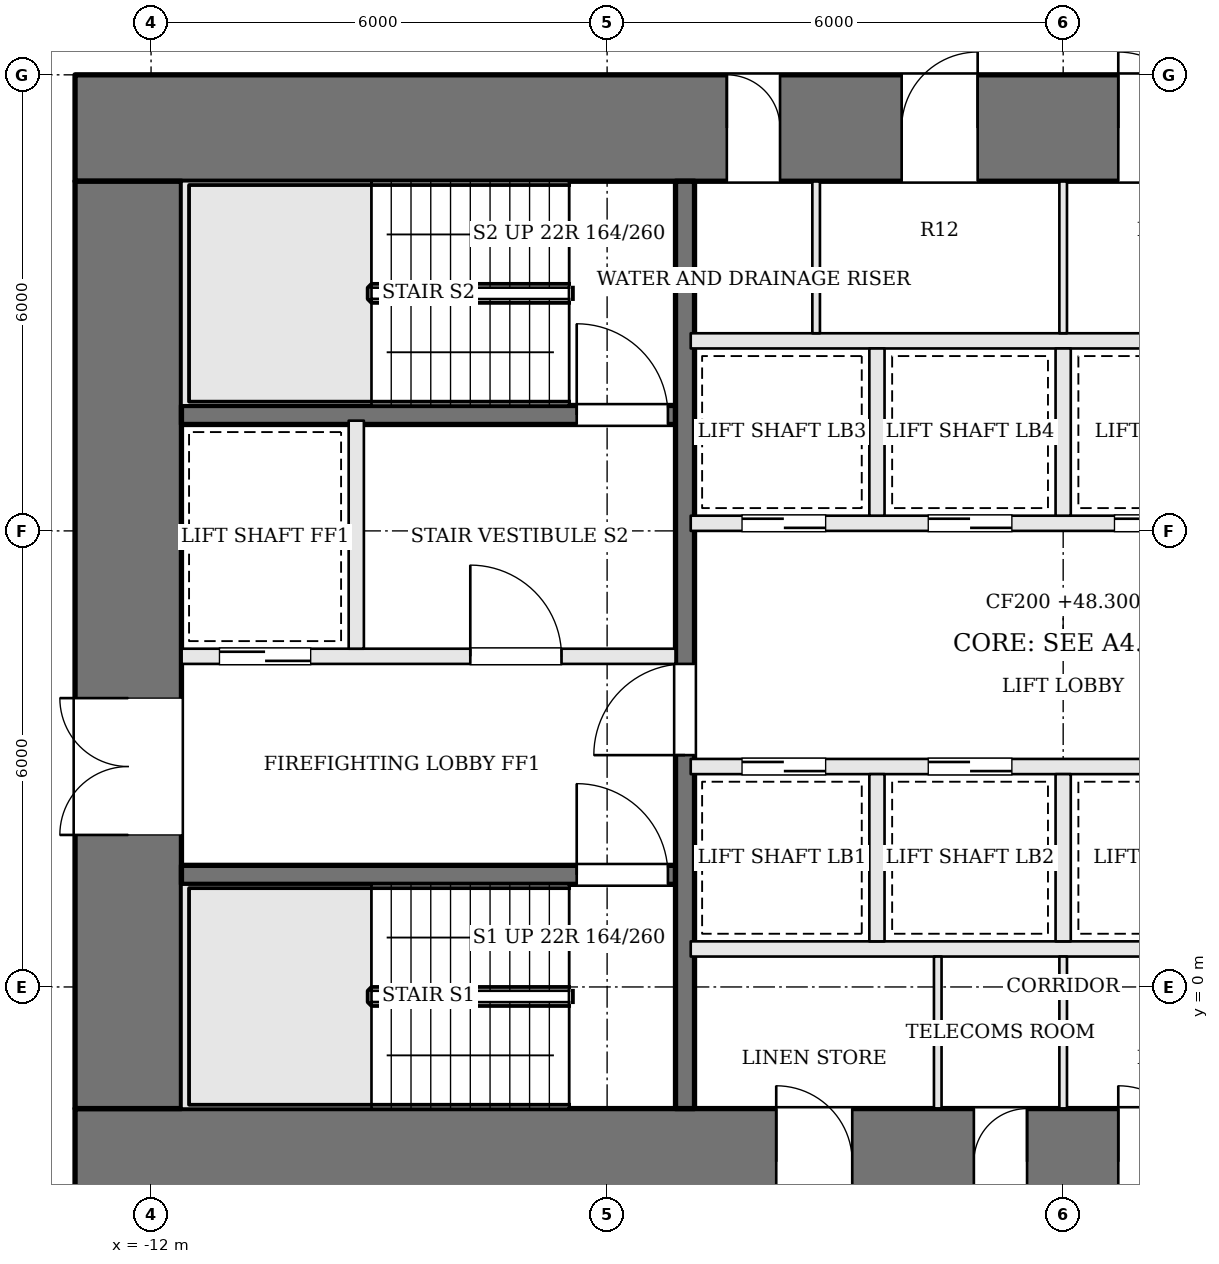
"""IFC4 building model, lengths in metres.
Left out: names, types, materials, properties, quantities, classifications, styles, units other than length and angle.
Written with IfcOpenShell. Run it as: python <this file> out.ifc"""

import sys

from ifc_helpers import new_model, si_unit, direction, frame, frame_2d, origin, place, context, subcontext, project, spatial, rectangle, extrude, element, fill, save


model = new_model("IFC4")
c1 = context("Model", 3, precision=1e-05, world=origin(), true_north=direction((0.0, 1.0)))
c2 = subcontext(c1, "Body", "Model", "MODEL_VIEW")
j1 = project(units=[si_unit("LENGTHUNIT", "METRE"), si_unit("PLANEANGLEUNIT", "RADIAN")], contexts=[c1])
p1 = place(None, origin())
s1 = spatial("IfcSite", under=j1, at=p1, CompositionType="ELEMENT")
p2 = place(p1, origin())
s2 = spatial("IfcBuilding", under=s1, at=p2, CompositionType="ELEMENT")
p3 = place(p2, frame((0.0, 0.0, 48.3)))
s3 = spatial("IfcBuildingStorey", under=s2, at=p3, CompositionType="ELEMENT", Elevation=48.3)
p4 = place(p3, frame((-13.0, 11.3, 0.0), z_axis=(0.0, 0.0, 1.0), x_axis=(1.0, 0.0, 0.0)))
e1 = element("IfcWall", 1, at=p4, inside=s3, PredefinedType="SHEAR", context=c2, shape_type="SweptSolid", body=[
    extrude(rectangle(XDim=26.0, YDim=1.4, at=frame_2d((13.0, 0.0))), origin(), (0.0, 0.0, 1.0), 3.6),
])
p5 = place(p4, frame((8.575, 0.0, 0.0)))
e2 = element("IfcOpeningElement", 2, at=p5, cuts=e1, PredefinedType="OPENING", context=c2, shape_type="SweptSolid", body=[
    extrude(rectangle(XDim=0.7, YDim=2.1, at=frame_2d((0.35, 1.05))), frame((0.0, 0.71, 0.0), z_axis=(0.0, -1.0, 0.0), x_axis=(1.0, 0.0, 0.0)), (0.0, 0.0, 1.0), 1.42),
])
p6 = place(p4, frame((10.875, 0.0, 0.0)))
e3 = element("IfcOpeningElement", 3, at=p6, cuts=e1, PredefinedType="OPENING", context=c2, shape_type="SweptSolid", body=[
    extrude(rectangle(XDim=1.0, YDim=2.1, at=frame_2d((0.5, 1.05))), frame((0.0, 0.71, 0.0), z_axis=(0.0, -1.0, 0.0), x_axis=(1.0, 0.0, 0.0)), (0.0, 0.0, 1.0), 1.42),
])
p7 = place(p4, frame((13.725, 0.0, 0.0)))
e4 = element("IfcOpeningElement", 4, at=p7, cuts=e1, PredefinedType="OPENING", context=c2, shape_type="SweptSolid", body=[
    extrude(rectangle(XDim=1.0, YDim=2.1, at=frame_2d((0.5, 1.05))), frame((0.0, 0.71, 0.0), z_axis=(0.0, -1.0, 0.0), x_axis=(1.0, 0.0, 0.0)), (0.0, 0.0, 1.0), 1.42),
])
p8 = place(p4, frame((16.175, 0.0, 0.0)))
e5 = element("IfcOpeningElement", 5, at=p8, cuts=e1, PredefinedType="OPENING", context=c2, shape_type="SweptSolid", body=[
    extrude(rectangle(XDim=1.0, YDim=2.1, at=frame_2d((0.5, 1.05))), frame((0.0, 0.71, 0.0), z_axis=(0.0, -1.0, 0.0), x_axis=(1.0, 0.0, 0.0)), (0.0, 0.0, 1.0), 1.42),
])
p9 = place(p3, frame((-13.0, -2.3, 0.0), z_axis=(0.0, 0.0, 1.0), x_axis=(1.0, 0.0, 0.0)))
e6 = element("IfcWall", 6, at=p9, inside=s3, PredefinedType="SHEAR", context=c2, shape_type="SweptSolid", body=[
    extrude(rectangle(XDim=26.0, YDim=1.4, at=frame_2d((13.0, 0.0))), origin(), (0.0, 0.0, 1.0), 3.6),
])
p10 = place(p9, frame((9.225, 0.0, 0.0)))
e7 = element("IfcOpeningElement", 7, at=p10, cuts=e6, PredefinedType="OPENING", context=c2, shape_type="SweptSolid", body=[
    extrude(rectangle(XDim=1.0, YDim=2.1, at=frame_2d((0.5, 1.05))), frame((0.0, 0.71, 0.0), z_axis=(0.0, -1.0, 0.0), x_axis=(1.0, 0.0, 0.0)), (0.0, 0.0, 1.0), 1.42),
])
p11 = place(p9, frame((11.825, 0.0, 0.0)))
e8 = element("IfcOpeningElement", 8, at=p11, cuts=e6, PredefinedType="OPENING", context=c2, shape_type="SweptSolid", body=[
    extrude(rectangle(XDim=0.7, YDim=2.1, at=frame_2d((0.35, 1.05))), frame((0.0, 0.71, 0.0), z_axis=(0.0, -1.0, 0.0), x_axis=(1.0, 0.0, 0.0)), (0.0, 0.0, 1.0), 1.42),
])
p12 = place(p9, frame((13.725, 0.0, 0.0)))
e9 = element("IfcOpeningElement", 9, at=p12, cuts=e6, PredefinedType="OPENING", context=c2, shape_type="SweptSolid", body=[
    extrude(rectangle(XDim=1.0, YDim=2.1, at=frame_2d((0.5, 1.05))), frame((0.0, 0.71, 0.0), z_axis=(0.0, -1.0, 0.0), x_axis=(1.0, 0.0, 0.0)), (0.0, 0.0, 1.0), 1.42),
])
p13 = place(p9, frame((16.225, 0.0, 0.0)))
e10 = element("IfcOpeningElement", 10, at=p13, cuts=e6, PredefinedType="OPENING", context=c2, shape_type="SweptSolid", body=[
    extrude(rectangle(XDim=0.9, YDim=2.1, at=frame_2d((0.45, 1.05))), frame((0.0, 0.71, 0.0), z_axis=(0.0, -1.0, 0.0), x_axis=(1.0, 0.0, 0.0)), (0.0, 0.0, 1.0), 1.42),
])
p14 = place(p3, frame((-12.3, -1.6, 0.0), z_axis=(0.0, 0.0, 1.0), x_axis=(0.0, 1.0, 0.0)))
e11 = element("IfcWall", 11, at=p14, inside=s3, PredefinedType="SHEAR", context=c2, shape_type="SweptSolid", body=[
    extrude(rectangle(XDim=12.2, YDim=1.4, at=frame_2d((6.1, 0.0))), origin(), (0.0, 0.0, 1.0), 3.6),
])
p15 = place(p14, frame((3.6, 0.0, 0.0)))
e12 = element("IfcOpeningElement", 12, at=p15, cuts=e11, PredefinedType="OPENING", context=c2, shape_type="SweptSolid", body=[
    extrude(rectangle(XDim=1.8, YDim=2.1, at=frame_2d((0.9, 1.05))), frame((0.0, 0.71, 0.0), z_axis=(0.0, -1.0, 0.0), x_axis=(1.0, 0.0, 0.0)), (0.0, 0.0, 1.0), 1.42),
])
p16 = place(p3, frame((-11.6, 1.475, 0.0), z_axis=(0.0, 0.0, 1.0), x_axis=(1.0, 0.0, 0.0)))
e13 = element("IfcWall", 13, at=p16, inside=s3, PredefinedType="SOLIDWALL", context=c2, shape_type="SweptSolid", body=[
    extrude(rectangle(XDim=6.5, YDim=0.25, at=frame_2d((3.25, 0.0))), origin(), (0.0, 0.0, 1.0), 3.4),
])
p17 = place(p16, frame((5.2, 0.0, 0.0)))
e14 = element("IfcOpeningElement", 14, at=p17, cuts=e13, PredefinedType="OPENING", context=c2, shape_type="SweptSolid", body=[
    extrude(rectangle(XDim=1.2, YDim=2.1, at=frame_2d((0.6, 1.05))), frame((0.0, 0.135, 0.0), z_axis=(0.0, -1.0, 0.0), x_axis=(1.0, 0.0, 0.0)), (0.0, 0.0, 1.0), 0.27),
])
p18 = place(p3, frame((-11.6, 4.35, 0.0), z_axis=(0.0, 0.0, 1.0), x_axis=(1.0, 0.0, 0.0)))
e15 = element("IfcWall", 15, at=p18, inside=s3, PredefinedType="SOLIDWALL", context=c2, shape_type="SweptSolid", body=[
    extrude(rectangle(XDim=6.5, YDim=0.2, at=frame_2d((3.25, 0.0))), origin(), (0.0, 0.0, 1.0), 3.4),
])
p19 = place(p18, frame((3.8, 0.0, 0.0)))
e16 = element("IfcOpeningElement", 16, at=p19, cuts=e15, PredefinedType="OPENING", context=c2, shape_type="SweptSolid", body=[
    extrude(rectangle(XDim=1.2, YDim=2.1, at=frame_2d((0.6, 1.05))), frame((0.0, 0.11, 0.0), z_axis=(0.0, -1.0, 0.0), x_axis=(1.0, 0.0, 0.0)), (0.0, 0.0, 1.0), 0.22),
])
p20 = place(p18, frame((0.5, 0.0, 0.0)))
e17 = element("IfcOpeningElement", 17, at=p20, cuts=e15, PredefinedType="OPENING", context=c2, shape_type="SweptSolid", body=[
    extrude(rectangle(XDim=1.2, YDim=2.1, at=frame_2d((0.6, 1.05))), frame((0.0, 0.11, 0.0), z_axis=(0.0, -1.0, 0.0), x_axis=(1.0, 0.0, 0.0)), (0.0, 0.0, 1.0), 0.22),
])
p21 = place(p3, frame((-11.6, 7.525, 0.0), z_axis=(0.0, 0.0, 1.0), x_axis=(1.0, 0.0, 0.0)))
e18 = element("IfcWall", 18, at=p21, inside=s3, PredefinedType="SOLIDWALL", context=c2, shape_type="SweptSolid", body=[
    extrude(rectangle(XDim=6.5, YDim=0.25, at=frame_2d((3.25, 0.0))), origin(), (0.0, 0.0, 1.0), 3.4),
])
p22 = place(p21, frame((5.2, 0.0, 0.0)))
e19 = element("IfcOpeningElement", 19, at=p22, cuts=e18, PredefinedType="OPENING", context=c2, shape_type="SweptSolid", body=[
    extrude(rectangle(XDim=1.2, YDim=2.1, at=frame_2d((0.6, 1.05))), frame((0.0, 0.135, 0.0), z_axis=(0.0, -1.0, 0.0), x_axis=(1.0, 0.0, 0.0)), (0.0, 0.0, 1.0), 0.27),
])
p23 = place(p3, frame((-9.3, 4.45, 0.0), z_axis=(0.0, 0.0, 1.0), x_axis=(0.0, 1.0, 0.0)))
e20 = element("IfcWall", 20, at=p23, inside=s3, PredefinedType="SOLIDWALL", context=c2, shape_type="SweptSolid", body=[
    extrude(rectangle(XDim=3.0, YDim=0.2, at=frame_2d((1.5, 0.0))), origin(), (0.0, 0.0, 1.0), 3.4),
])
p24 = place(p3, frame((-4.975, -1.6, 0.0), z_axis=(0.0, 0.0, 1.0), x_axis=(0.0, 1.0, 0.0)))
e21 = element("IfcWall", 21, at=p24, inside=s3, PredefinedType="SOLIDWALL", context=c2, shape_type="SweptSolid", body=[
    extrude(rectangle(XDim=12.2, YDim=0.25, at=frame_2d((6.1, 0.0))), origin(), (0.0, 0.0, 1.0), 3.4),
])
p25 = place(p24, frame((4.65, 0.0, 0.0)))
e22 = element("IfcOpeningElement", 22, at=p25, cuts=e21, PredefinedType="OPENING", context=c2, shape_type="SweptSolid", body=[
    extrude(rectangle(XDim=1.2, YDim=2.1, at=frame_2d((0.6, 1.05))), frame((0.0, 0.135, 0.0), z_axis=(0.0, -1.0, 0.0), x_axis=(1.0, 0.0, 0.0)), (0.0, 0.0, 1.0), 0.27),
])
p26 = place(p3, frame((-4.9, 0.5, 0.0), z_axis=(0.0, 0.0, 1.0), x_axis=(1.0, 0.0, 0.0)))
e23 = element("IfcWall", 23, at=p26, inside=s3, PredefinedType="SOLIDWALL", context=c2, shape_type="SweptSolid", body=[
    extrude(rectangle(XDim=9.8, YDim=0.2, at=frame_2d((4.9, 0.0))), origin(), (0.0, 0.0, 1.0), 3.4),
])
p27 = place(p3, frame((-4.9, 2.9, 0.0), z_axis=(0.0, 0.0, 1.0), x_axis=(1.0, 0.0, 0.0)))
e24 = element("IfcWall", 24, at=p27, inside=s3, PredefinedType="SOLIDWALL", context=c2, shape_type="SweptSolid", body=[
    extrude(rectangle(XDim=9.8, YDim=0.2, at=frame_2d((4.9, 0.0))), origin(), (0.0, 0.0, 1.0), 3.4),
])
p28 = place(p27, frame((0.675, 0.0, 0.0)))
e25 = element("IfcOpeningElement", 25, at=p28, cuts=e24, PredefinedType="OPENING", context=c2, shape_type="SweptSolid", body=[
    extrude(rectangle(XDim=1.1, YDim=2.1, at=frame_2d((0.55, 1.05))), frame((0.0, 0.11, 0.0), z_axis=(0.0, -1.0, 0.0), x_axis=(1.0, 0.0, 0.0)), (0.0, 0.0, 1.0), 0.22),
])
p29 = place(p27, frame((3.125, 0.0, 0.0)))
e26 = element("IfcOpeningElement", 26, at=p29, cuts=e24, PredefinedType="OPENING", context=c2, shape_type="SweptSolid", body=[
    extrude(rectangle(XDim=1.1, YDim=2.1, at=frame_2d((0.55, 1.05))), frame((0.0, 0.11, 0.0), z_axis=(0.0, -1.0, 0.0), x_axis=(1.0, 0.0, 0.0)), (0.0, 0.0, 1.0), 0.22),
])
p30 = place(p3, frame((-4.9, 6.1, 0.0), z_axis=(0.0, 0.0, 1.0), x_axis=(1.0, 0.0, 0.0)))
e27 = element("IfcWall", 27, at=p30, inside=s3, PredefinedType="SOLIDWALL", context=c2, shape_type="SweptSolid", body=[
    extrude(rectangle(XDim=9.8, YDim=0.2, at=frame_2d((4.9, 0.0))), origin(), (0.0, 0.0, 1.0), 3.4),
])
p31 = place(p30, frame((0.675, 0.0, 0.0)))
e28 = element("IfcOpeningElement", 28, at=p31, cuts=e27, PredefinedType="OPENING", context=c2, shape_type="SweptSolid", body=[
    extrude(rectangle(XDim=1.1, YDim=2.1, at=frame_2d((0.55, 1.05))), frame((0.0, 0.11, 0.0), z_axis=(0.0, -1.0, 0.0), x_axis=(1.0, 0.0, 0.0)), (0.0, 0.0, 1.0), 0.22),
])
p32 = place(p30, frame((3.125, 0.0, 0.0)))
e29 = element("IfcOpeningElement", 29, at=p32, cuts=e27, PredefinedType="OPENING", context=c2, shape_type="SweptSolid", body=[
    extrude(rectangle(XDim=1.1, YDim=2.1, at=frame_2d((0.55, 1.05))), frame((0.0, 0.11, 0.0), z_axis=(0.0, -1.0, 0.0), x_axis=(1.0, 0.0, 0.0)), (0.0, 0.0, 1.0), 0.22),
])
p33 = place(p30, frame((5.575, 0.0, 0.0)))
e30 = element("IfcOpeningElement", 30, at=p33, cuts=e27, PredefinedType="OPENING", context=c2, shape_type="SweptSolid", body=[
    extrude(rectangle(XDim=1.1, YDim=2.1, at=frame_2d((0.55, 1.05))), frame((0.0, 0.11, 0.0), z_axis=(0.0, -1.0, 0.0), x_axis=(1.0, 0.0, 0.0)), (0.0, 0.0, 1.0), 0.22),
])
p34 = place(p30, frame((8.025, 0.0, 0.0)))
e31 = element("IfcOpeningElement", 31, at=p34, cuts=e27, PredefinedType="OPENING", context=c2, shape_type="SweptSolid", body=[
    extrude(rectangle(XDim=1.1, YDim=2.1, at=frame_2d((0.55, 1.05))), frame((0.0, 0.11, 0.0), z_axis=(0.0, -1.0, 0.0), x_axis=(1.0, 0.0, 0.0)), (0.0, 0.0, 1.0), 0.22),
])
p35 = place(p3, frame((-4.9, 8.5, 0.0), z_axis=(0.0, 0.0, 1.0), x_axis=(1.0, 0.0, 0.0)))
e32 = element("IfcWall", 32, at=p35, inside=s3, PredefinedType="SOLIDWALL", context=c2, shape_type="SweptSolid", body=[
    extrude(rectangle(XDim=9.8, YDim=0.2, at=frame_2d((4.9, 0.0))), origin(), (0.0, 0.0, 1.0), 3.4),
])
for number, where, z_axis, x_axis in (
    (33, (-2.45, 0.6, 0.0), (0.0, 0.0, 1.0), (0.0, 1.0, 0.0)),
    (34, (0.0, 0.6, 0.0), (0.0, 0.0, 1.0), (0.0, 1.0, 0.0)),
    (35, (-2.45, 6.2, 0.0), (0.0, 0.0, 1.0), (0.0, 1.0, 0.0)),
    (36, (0.0, 6.2, 0.0), (0.0, 0.0, 1.0), (0.0, 1.0, 0.0)),
):
    element("IfcWall", number, at=place(p3, frame(where, z_axis=z_axis, x_axis=x_axis)), inside=s3, PredefinedType="SOLIDWALL", context=c2, shape_type="SweptSolid", body=[
        extrude(rectangle(XDim=2.2, YDim=0.2, at=frame_2d((1.1, 0.0))), origin(), (0.0, 0.0, 1.0), 3.4),
    ])
for number, where, z_axis, x_axis in (
    (37, (-1.65, -1.6, 0.0), (0.0, 0.0, 1.0), (0.0, 1.0, 0.0)),
    (38, (0.0, -1.6, 0.0), (0.0, 0.0, 1.0), (0.0, 1.0, 0.0)),
    (39, (-3.25, 8.6, 0.0), (0.0, 0.0, 1.0), (0.0, 1.0, 0.0)),
    (40, (0.0, 8.6, 0.0), (0.0, 0.0, 1.0), (0.0, 1.0, 0.0)),
):
    element("IfcWall", number, at=place(p3, frame(where, z_axis=z_axis, x_axis=x_axis)), inside=s3, PredefinedType="PARTITIONING", context=c2, shape_type="SweptSolid", body=[
        extrude(rectangle(XDim=2.0, YDim=0.1, at=frame_2d((1.0, 0.0))), origin(), (0.0, 0.0, 1.0), 3.4),
    ])
p36 = place(p15, origin())
e41 = element("IfcDoor", 41, at=p36, inside=s3, OperationType="DOUBLE_DOOR_SINGLE_SWING", PredefinedType="DOOR", context=c2, shape_type="SweptSolid", body=[
    extrude(rectangle(XDim=1.8, YDim=2.1, at=frame_2d((0.9, 1.05))), frame((0.0, 0.025, 0.0), z_axis=(0.0, -1.0, 0.0), x_axis=(1.0, 0.0, 0.0)), (0.0, 0.0, 1.0), 0.05),
])
fill(e12, e41)
p37 = place(p25, origin())
e42 = element("IfcDoor", 42, at=p37, inside=s3, OperationType="SINGLE_SWING_LEFT", PredefinedType="DOOR", context=c2, shape_type="SweptSolid", body=[
    extrude(rectangle(XDim=1.2, YDim=2.1, at=frame_2d((0.6, 1.05))), frame((0.0, 0.025, 0.0), z_axis=(0.0, -1.0, 0.0), x_axis=(1.0, 0.0, 0.0)), (0.0, 0.0, 1.0), 0.05),
])
fill(e22, e42)
p38 = place(p19, origin())
e43 = element("IfcDoor", 43, at=p38, inside=s3, OperationType="SINGLE_SWING_LEFT", PredefinedType="DOOR", context=c2, shape_type="SweptSolid", body=[
    extrude(rectangle(XDim=1.2, YDim=2.1, at=frame_2d((0.6, 1.05))), frame((0.0, 0.025, 0.0), z_axis=(0.0, -1.0, 0.0), x_axis=(1.0, 0.0, 0.0)), (0.0, 0.0, 1.0), 0.05),
])
fill(e16, e43)
p39 = place(p17, origin())
e44 = element("IfcDoor", 44, at=p39, inside=s3, OperationType="SINGLE_SWING_LEFT", PredefinedType="DOOR", context=c2, shape_type="SweptSolid", body=[
    extrude(rectangle(XDim=1.2, YDim=2.1, at=frame_2d((0.6, 1.05))), frame((0.0, 0.025, 0.0), z_axis=(0.0, -1.0, 0.0), x_axis=(1.0, 0.0, 0.0)), (0.0, 0.0, 1.0), 0.05),
])
fill(e14, e44)
p40 = place(p22, origin())
e45 = element("IfcDoor", 45, at=p40, inside=s3, OperationType="SINGLE_SWING_LEFT", PredefinedType="DOOR", context=c2, shape_type="SweptSolid", body=[
    extrude(rectangle(XDim=1.2, YDim=2.1, at=frame_2d((0.6, 1.05))), frame((0.0, 0.025, 0.0), z_axis=(0.0, -1.0, 0.0), x_axis=(1.0, 0.0, 0.0)), (0.0, 0.0, 1.0), 0.05),
])
fill(e19, e45)
p41 = place(p20, origin())
e46 = element("IfcDoor", 46, at=p41, inside=s3, OperationType="SLIDING_TO_RIGHT", PredefinedType="DOOR", context=c2, shape_type="SweptSolid", body=[
    extrude(rectangle(XDim=1.2, YDim=2.1, at=frame_2d((0.6, 1.05))), frame((0.0, 0.025, 0.0), z_axis=(0.0, -1.0, 0.0), x_axis=(1.0, 0.0, 0.0)), (0.0, 0.0, 1.0), 0.05),
])
fill(e17, e46)
p42 = place(p28, origin())
e47 = element("IfcDoor", 47, at=p42, inside=s3, OperationType="SLIDING_TO_RIGHT", PredefinedType="DOOR", context=c2, shape_type="SweptSolid", body=[
    extrude(rectangle(XDim=1.1, YDim=2.1, at=frame_2d((0.55, 1.05))), frame((0.0, 0.025, 0.0), z_axis=(0.0, -1.0, 0.0), x_axis=(1.0, 0.0, 0.0)), (0.0, 0.0, 1.0), 0.05),
])
fill(e25, e47)
p43 = place(p29, origin())
e48 = element("IfcDoor", 48, at=p43, inside=s3, OperationType="SLIDING_TO_LEFT", PredefinedType="DOOR", context=c2, shape_type="SweptSolid", body=[
    extrude(rectangle(XDim=1.1, YDim=2.1, at=frame_2d((0.55, 1.05))), frame((0.0, 0.025, 0.0), z_axis=(0.0, -1.0, 0.0), x_axis=(1.0, 0.0, 0.0)), (0.0, 0.0, 1.0), 0.05),
])
fill(e26, e48)
p44 = place(p31, origin())
e49 = element("IfcDoor", 49, at=p44, inside=s3, OperationType="SLIDING_TO_RIGHT", PredefinedType="DOOR", context=c2, shape_type="SweptSolid", body=[
    extrude(rectangle(XDim=1.1, YDim=2.1, at=frame_2d((0.55, 1.05))), frame((0.0, 0.025, 0.0), z_axis=(0.0, -1.0, 0.0), x_axis=(1.0, 0.0, 0.0)), (0.0, 0.0, 1.0), 0.05),
])
fill(e28, e49)
p45 = place(p32, origin())
e50 = element("IfcDoor", 50, at=p45, inside=s3, OperationType="SLIDING_TO_LEFT", PredefinedType="DOOR", context=c2, shape_type="SweptSolid", body=[
    extrude(rectangle(XDim=1.1, YDim=2.1, at=frame_2d((0.55, 1.05))), frame((0.0, 0.025, 0.0), z_axis=(0.0, -1.0, 0.0), x_axis=(1.0, 0.0, 0.0)), (0.0, 0.0, 1.0), 0.05),
])
fill(e29, e50)
p46 = place(p33, origin())
e51 = element("IfcDoor", 51, at=p46, inside=s3, OperationType="SLIDING_TO_RIGHT", PredefinedType="DOOR", context=c2, shape_type="SweptSolid", body=[
    extrude(rectangle(XDim=1.1, YDim=2.1, at=frame_2d((0.55, 1.05))), frame((0.0, 0.025, 0.0), z_axis=(0.0, -1.0, 0.0), x_axis=(1.0, 0.0, 0.0)), (0.0, 0.0, 1.0), 0.05),
])
fill(e30, e51)
p47 = place(p10, origin())
e52 = element("IfcDoor", 52, at=p47, inside=s3, OperationType="SINGLE_SWING_LEFT", PredefinedType="DOOR", context=c2, shape_type="SweptSolid", body=[
    extrude(rectangle(XDim=1.0, YDim=2.1, at=frame_2d((0.5, 1.05))), frame((0.0, 0.025, 0.0), z_axis=(0.0, -1.0, 0.0), x_axis=(1.0, 0.0, 0.0)), (0.0, 0.0, 1.0), 0.05),
])
fill(e7, e52)
p48 = place(p11, origin())
e53 = element("IfcDoor", 53, at=p48, inside=s3, OperationType="SINGLE_SWING_RIGHT", PredefinedType="DOOR", context=c2, shape_type="SweptSolid", body=[
    extrude(rectangle(XDim=0.7, YDim=2.1, at=frame_2d((0.35, 1.05))), frame((0.0, 0.025, 0.0), z_axis=(0.0, -1.0, 0.0), x_axis=(1.0, 0.0, 0.0)), (0.0, 0.0, 1.0), 0.05),
])
fill(e8, e53)
p49 = place(p12, origin())
e54 = element("IfcDoor", 54, at=p49, inside=s3, OperationType="SINGLE_SWING_LEFT", PredefinedType="DOOR", context=c2, shape_type="SweptSolid", body=[
    extrude(rectangle(XDim=1.0, YDim=2.1, at=frame_2d((0.5, 1.05))), frame((0.0, 0.025, 0.0), z_axis=(0.0, -1.0, 0.0), x_axis=(1.0, 0.0, 0.0)), (0.0, 0.0, 1.0), 0.05),
])
fill(e9, e54)
p50 = place(p5, origin())
e55 = element("IfcDoor", 55, at=p50, inside=s3, OperationType="SINGLE_SWING_LEFT", PredefinedType="DOOR", context=c2, shape_type="SweptSolid", body=[
    extrude(rectangle(XDim=0.7, YDim=2.1, at=frame_2d((0.35, 1.05))), frame((0.0, 0.025, 0.0), z_axis=(0.0, -1.0, 0.0), x_axis=(1.0, 0.0, 0.0)), (0.0, 0.0, 1.0), 0.05),
])
fill(e2, e55)
p51 = place(p6, origin())
e56 = element("IfcDoor", 56, at=p51, inside=s3, OperationType="SINGLE_SWING_RIGHT", PredefinedType="DOOR", context=c2, shape_type="SweptSolid", body=[
    extrude(rectangle(XDim=1.0, YDim=2.1, at=frame_2d((0.5, 1.05))), frame((0.0, 0.025, 0.0), z_axis=(0.0, -1.0, 0.0), x_axis=(1.0, 0.0, 0.0)), (0.0, 0.0, 1.0), 0.05),
])
fill(e3, e56)
p52 = place(p7, origin())
e57 = element("IfcDoor", 57, at=p52, inside=s3, OperationType="SINGLE_SWING_LEFT", PredefinedType="DOOR", context=c2, shape_type="SweptSolid", body=[
    extrude(rectangle(XDim=1.0, YDim=2.1, at=frame_2d((0.5, 1.05))), frame((0.0, 0.025, 0.0), z_axis=(0.0, -1.0, 0.0), x_axis=(1.0, 0.0, 0.0)), (0.0, 0.0, 1.0), 0.05),
])
fill(e4, e57)
save(model, sys.argv[1])
